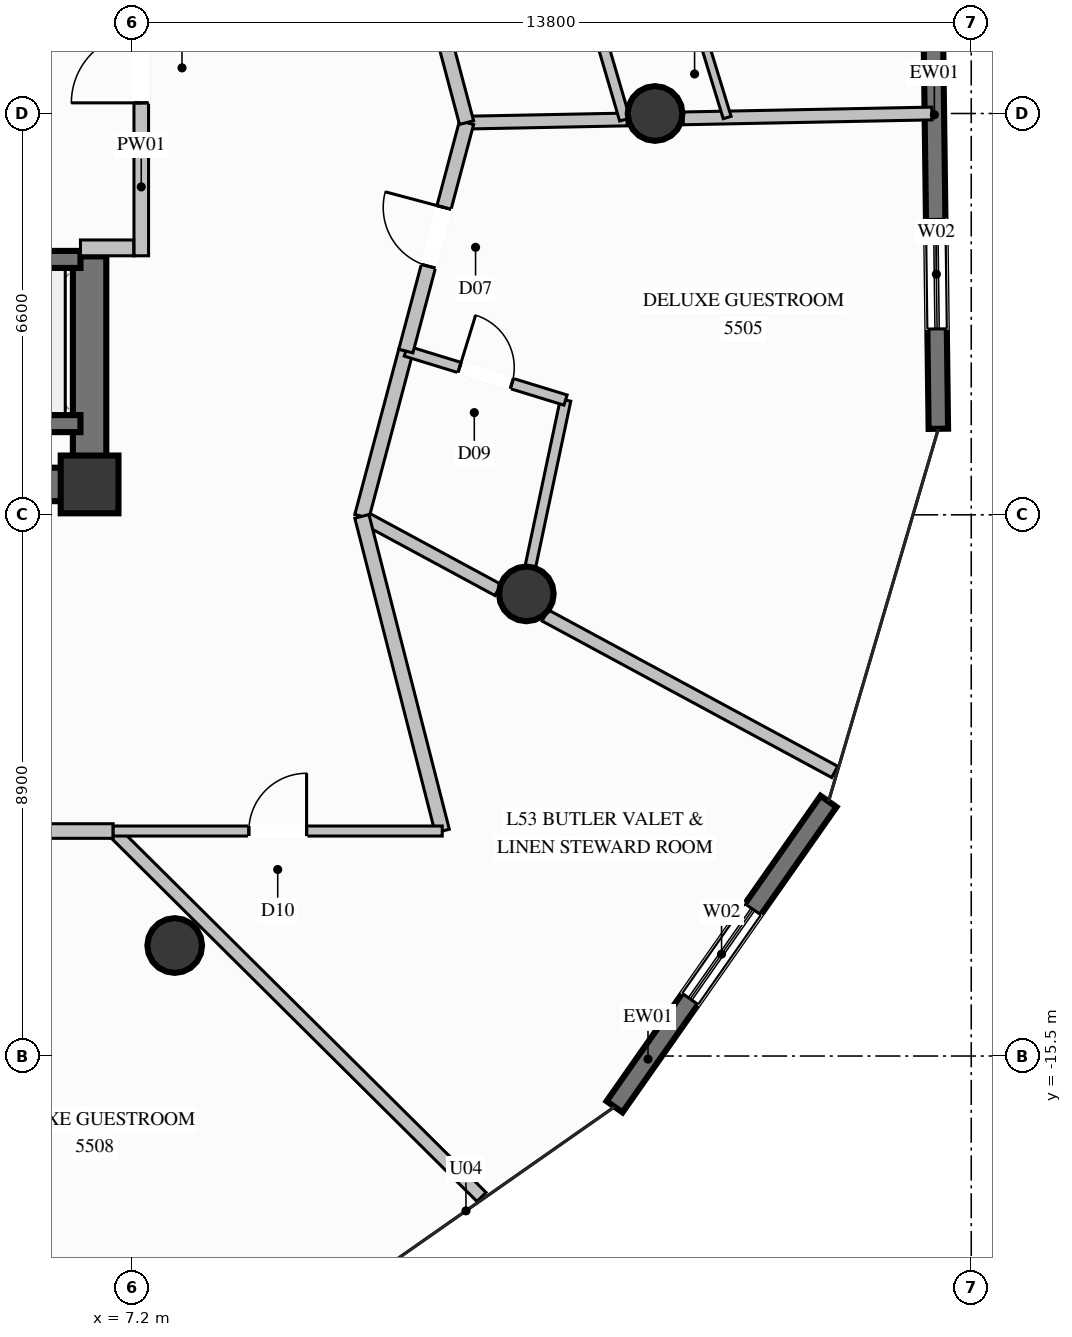
"""IFC4 building model, lengths in metres.
Left out: names, types, materials, properties, quantities, classifications, styles, units other than length and angle.
Written with IfcOpenShell. Run it as: python <this file> out.ifc"""

import sys

from ifc_helpers import new_model, si_unit, direction, frame, frame_2d, origin, origin_2d, place, context, subcontext, project, spatial, rectangle, circle, extrude, element, fill, save


model = new_model("IFC4")
c1 = context("Model", 3, precision=1e-05, world=origin(), true_north=direction((0.0, 1.0)))
c2 = subcontext(c1, "Body", "Model", "MODEL_VIEW")
j1 = project(units=[si_unit("LENGTHUNIT", "METRE"), si_unit("PLANEANGLEUNIT", "RADIAN")], contexts=[c1])
p1 = place(None, origin())
s1 = spatial("IfcSite", under=j1, at=p1, CompositionType="ELEMENT")
p2 = place(p1, origin())
s2 = spatial("IfcBuilding", under=s1, at=p2, CompositionType="ELEMENT")
p3 = place(p2, frame((0.0, 0.0, 205.6)))
s3 = spatial("IfcBuildingStorey", under=s2, at=p3, CompositionType="ELEMENT", Elevation=205.6)
p4 = place(p3, frame((6.5, -6.1, 0.0), z_axis=(0.0, 0.0, 1.0), x_axis=(1.0, 0.0, 0.0)))
e1 = element("IfcColumn", 1, at=p4, inside=s3, PredefinedType="COLUMN", context=c2, shape_type="SweptSolid", body=[
    extrude(rectangle(XDim=0.95, YDim=0.95, at=origin_2d()), origin(), (0.0, 0.0, 1.0), 3.6),
])
p5 = place(p3, frame((4.15, -6.1, 0.0), z_axis=(0.0, 0.0, 1.0), x_axis=(1.0, 0.0, 0.0)))
e2 = element("IfcWall", 2, at=p5, inside=s3, PredefinedType="SHEAR", context=c2, shape_type="SweptSolid", body=[
    extrude(rectangle(XDim=2.075, YDim=0.55, at=frame_2d((1.038, 0.0))), origin(), (0.0, 0.0, 1.0), 3.6),
])
p6 = place(p3, frame((6.5, -6.375, 0.0), z_axis=(0.0, 0.0, 1.0), x_axis=(0.0, 1.0, 0.0)))
e3 = element("IfcWall", 3, at=p6, inside=s3, PredefinedType="SHEAR", context=c2, shape_type="SweptSolid", body=[
    extrude(rectangle(XDim=4.025, YDim=0.55, at=frame_2d((2.012, 0.0))), origin(), (0.0, 0.0, 1.0), 3.6),
])
for number, where, z_axis, x_axis in (
    (4, (15.8, 0.0, 0.0), (0.0, 0.0, 1.0), (1.0, 0.0, 0.0)),
    (5, (7.9, -13.683, 0.0), (0.0, 0.0, 1.0), (1.0, 0.0, 0.0)),
    (6, (13.683, -7.9, 0.0), (0.0, 0.0, 1.0), (1.0, 0.0, 0.0)),
):
    element("IfcColumn", number, at=place(p3, frame(where, z_axis=z_axis, x_axis=x_axis)), inside=s3, PredefinedType="COLUMN", context=c2, shape_type="SweptSolid", body=[
        extrude(circle(Radius=0.45, at=origin_2d()), origin(), (0.0, 0.0, 1.0), 3.6),
    ])
p7 = place(p3, frame((18.653, -11.313, 0.0), z_axis=(0.0, 0.0, 1.0), x_axis=(-0.573863076695, -0.818951261802, 0.0)))
e7 = element("IfcWall", 7, at=p7, inside=s3, PredefinedType="SOLIDWALL", context=c2, shape_type="SweptSolid", body=[
    extrude(rectangle(XDim=6.132, YDim=0.32, at=frame_2d((3.066, 0.0))), origin(), (0.0, 0.0, 1.0), 3.36),
])
p8 = place(p7, frame((2.166, 0.0, 0.35)))
e8 = element("IfcOpeningElement", 8, at=p8, cuts=e7, PredefinedType="OPENING", context=c2, shape_type="SweptSolid", body=[
    extrude(rectangle(XDim=1.8, YDim=2.6, at=frame_2d((0.9, 1.3))), frame((0.0, 0.17, 0.0), z_axis=(0.0, -1.0, 0.0), x_axis=(1.0, 0.0, 0.0)), (0.0, 0.0, 1.0), 0.34),
])
p9 = place(p3, frame((20.375, 1.451, 0.0), z_axis=(0.0, 0.0, 1.0), x_axis=(0.012654885904, -0.999919923725, 0.0)))
e9 = element("IfcWall", 9, at=p9, inside=s3, PredefinedType="SOLIDWALL", context=c2, shape_type="SweptSolid", body=[
    extrude(rectangle(XDim=6.636, YDim=0.32, at=frame_2d((3.318, 0.0))), origin(), (0.0, 0.0, 1.0), 3.36),
])
p10 = place(p9, frame((3.194, 0.0, 0.35)))
e10 = element("IfcOpeningElement", 10, at=p10, cuts=e9, PredefinedType="OPENING", context=c2, shape_type="SweptSolid", body=[
    extrude(rectangle(XDim=1.8, YDim=2.6, at=frame_2d((0.9, 1.3))), frame((0.0, 0.17, 0.0), z_axis=(0.0, -1.0, 0.0), x_axis=(1.0, 0.0, 0.0)), (0.0, 0.0, 1.0), 0.34),
])
p11 = place(p3, frame((4.15, -5.1, 0.0), z_axis=(0.0, 0.0, 1.0), x_axis=(1.0, 0.0, 0.0)))
e11 = element("IfcWall", 11, at=p11, inside=s3, PredefinedType="SOLIDWALL", context=c2, shape_type="SweptSolid", body=[
    extrude(rectangle(XDim=2.2, YDim=0.28, at=frame_2d((1.1, 0.0))), origin(), (0.0, 0.0, 1.0), 3.36),
])
p12 = place(p3, frame((6.35, -2.4, 0.0), z_axis=(0.0, 0.0, 1.0), x_axis=(-1.0, 0.0, 0.0)))
e12 = element("IfcWall", 12, at=p12, inside=s3, PredefinedType="SOLIDWALL", context=c2, shape_type="SweptSolid", body=[
    extrude(rectangle(XDim=2.2, YDim=0.28, at=frame_2d((1.1, 0.0))), origin(), (0.0, 0.0, 1.0), 3.36),
])
p13 = place(p12, frame((0.5, 0.0, 0.0)))
e13 = element("IfcOpeningElement", 13, at=p13, cuts=e12, PredefinedType="OPENING", context=c2, shape_type="SweptSolid", body=[
    extrude(rectangle(XDim=1.2, YDim=2.2, at=frame_2d((0.6, 1.1))), frame((0.0, 0.15, 0.0), z_axis=(0.0, -1.0, 0.0), x_axis=(1.0, 0.0, 0.0)), (0.0, 0.0, 1.0), 0.3),
])
p14 = place(p3, frame((7.35, -2.34, 0.0), z_axis=(0.0, 0.0, 1.0), x_axis=(0.0, 1.0, 0.0)))
e14 = element("IfcWall", 14, at=p14, inside=s3, PredefinedType="PARTITIONING", context=c2, shape_type="SweptSolid", body=[
    extrude(rectangle(XDim=5.02, YDim=0.24, at=frame_2d((2.51, 0.0))), origin(), (0.0, 0.0, 1.0), 2.445),
])
p15 = place(p14, frame((2.515, 0.0, 0.0)))
e15 = element("IfcOpeningElement", 15, at=p15, cuts=e14, PredefinedType="OPENING", context=c2, shape_type="SweptSolid", body=[
    extrude(rectangle(XDim=1.15, YDim=2.2, at=frame_2d((0.575, 1.1))), frame((0.0, 0.13, 0.0), z_axis=(0.0, -1.0, 0.0), x_axis=(1.0, 0.0, 0.0)), (0.0, 0.0, 1.0), 0.26),
])
p16 = place(p3, frame((6.35, -2.21, 0.0), z_axis=(0.0, 0.0, 1.0), x_axis=(1.0, 0.0, 0.0)))
e16 = element("IfcWall", 16, at=p16, inside=s3, PredefinedType="PARTITIONING", context=c2, shape_type="SweptSolid", body=[
    extrude(rectangle(XDim=0.875, YDim=0.26, at=frame_2d((0.438, 0.0))), origin(), (0.0, 0.0, 1.0), 3.36),
])
p17 = place(p3, frame((12.7, -0.15, 0.0), z_axis=(0.0, 0.0, 1.0), x_axis=(0.999806076636, 0.019692869828, 0.0)))
e17 = element("IfcWall", 17, at=p17, inside=s3, PredefinedType="PARTITIONING", context=c2, shape_type="SweptSolid", body=[
    extrude(rectangle(XDim=2.641, YDim=0.21, at=frame_2d((1.32, 0.0))), origin(), (0.0, 0.0, 1.0), 3.36),
])
p18 = place(p3, frame((16.263, -0.08, 0.0), z_axis=(0.0, 0.0, 1.0), x_axis=(0.999808394628, 0.019574831579, 0.0)))
e18 = element("IfcWall", 18, at=p18, inside=s3, PredefinedType="PARTITIONING", context=c2, shape_type="SweptSolid", body=[
    extrude(rectangle(XDim=4.091, YDim=0.21, at=frame_2d((2.045, 0.0))), origin(), (0.0, 0.0, 1.0), 3.36),
])
p19 = place(p3, frame((10.978, -6.625, 0.0), z_axis=(0.0, 0.0, 1.0), x_axis=(0.879758566632, -0.47542072361, 0.0)))
e19 = element("IfcWall", 19, at=p19, inside=s3, PredefinedType="PARTITIONING", context=c2, shape_type="SweptSolid", body=[
    extrude(rectangle(XDim=2.545, YDim=0.21, at=frame_2d((1.272, 0.0))), origin(), (0.0, 0.0, 1.0), 2.877),
])
p20 = place(p3, frame((13.992, -8.254, 0.0), z_axis=(0.0, 0.0, 1.0), x_axis=(0.879751884647, -0.47543308831, 0.0)))
e20 = element("IfcWall", 20, at=p20, inside=s3, PredefinedType="PARTITIONING", context=c2, shape_type="SweptSolid", body=[
    extrude(rectangle(XDim=5.414, YDim=0.21, at=frame_2d((2.707, 0.0))), origin(), (0.0, 0.0, 1.0), 3.36),
])
p21 = place(p3, frame((10.978, -6.625, 0.0), z_axis=(0.0, 0.0, 1.0), x_axis=(0.256944245483, 0.966426228283, 0.0)))
e21 = element("IfcWall", 21, at=p21, inside=s3, PredefinedType="PARTITIONING", context=c2, shape_type="SweptSolid", body=[
    extrude(rectangle(XDim=2.813, YDim=0.24, at=frame_2d((1.407, 0.0))), origin(), (0.0, 0.0, 1.0), 3.36),
])
p22 = place(p3, frame((13.622, -8.054, 0.0), z_axis=(0.0, 0.0, 1.0), x_axis=(0.206691433245, 0.978406179162, 0.0)))
e22 = element("IfcWall", 22, at=p22, inside=s3, PredefinedType="PLUMBINGWALL", context=c2, shape_type="SweptSolid", body=[
    extrude(rectangle(XDim=3.415, YDim=0.175, at=frame_2d((1.708, 0.0))), origin(), (0.0, 0.0, 1.0), 2.929),
])
p23 = place(p3, frame((11.701, -3.906, 0.0), z_axis=(0.0, 0.0, 1.0), x_axis=(0.955922959591, -0.293617600506, 0.0)))
e23 = element("IfcWall", 23, at=p23, inside=s3, PredefinedType="PLUMBINGWALL", context=c2, shape_type="SweptSolid", body=[
    extrude(rectangle(XDim=2.748, YDim=0.175, at=frame_2d((1.374, 0.0))), origin(), (0.0, 0.0, 1.0), 3.36),
])
p24 = place(p23, frame((0.924, 0.0, 0.0)))
e24 = element("IfcOpeningElement", 24, at=p24, cuts=e23, PredefinedType="OPENING", context=c2, shape_type="SweptSolid", body=[
    extrude(rectangle(XDim=0.9, YDim=2.1, at=frame_2d((0.45, 1.05))), frame((0.0, 0.098, 0.0), z_axis=(0.0, -1.0, 0.0), x_axis=(1.0, 0.0, 0.0)), (0.0, 0.0, 1.0), 0.195),
])
p25 = place(p3, frame((11.701, -3.906, 0.0), z_axis=(0.0, 0.0, 1.0), x_axis=(0.257037057674, 0.966401547486, 0.0)))
e25 = element("IfcWall", 25, at=p25, inside=s3, PredefinedType="PARTITIONING", context=c2, shape_type="SweptSolid", body=[
    extrude(rectangle(XDim=3.887, YDim=0.24, at=frame_2d((1.943, 0.0))), origin(), (0.0, 0.0, 1.0), 3.36),
])
p26 = place(p25, frame((1.443, 0.0, 0.0)))
e26 = element("IfcOpeningElement", 26, at=p26, cuts=e25, PredefinedType="OPENING", context=c2, shape_type="SweptSolid", body=[
    extrude(rectangle(XDim=1.0, YDim=2.2, at=frame_2d((0.5, 1.1))), frame((0.0, 0.13, 0.0), z_axis=(0.0, -1.0, 0.0), x_axis=(1.0, 0.0, 0.0)), (0.0, 0.0, 1.0), 0.26),
])
p27 = place(p3, frame((12.7, -0.15, 0.0), z_axis=(0.0, 0.0, 1.0), x_axis=(-0.256858081143, 0.966449132729, 0.0)))
e27 = element("IfcWall", 27, at=p27, inside=s3, PredefinedType="PARTITIONING", context=c2, shape_type="SweptSolid", body=[
    extrude(rectangle(XDim=2.814, YDim=0.24, at=frame_2d((1.407, 0.0))), origin(), (0.0, 0.0, 1.0), 3.36),
])
p28 = place(p3, frame((15.302, -0.099, 0.0), z_axis=(0.0, 0.0, 1.0), x_axis=(-0.280987384428, 0.959711461739, 0.0)))
e28 = element("IfcWall", 28, at=p28, inside=s3, PredefinedType="PLUMBINGWALL", context=c2, shape_type="SweptSolid", body=[
    extrude(rectangle(XDim=3.342, YDim=0.175, at=frame_2d((1.671, 0.0))), origin(), (0.0, 0.0, 1.0), 2.929),
])
p29 = place(p3, frame((16.986, -0.066, 0.0), z_axis=(0.0, 0.0, 1.0), x_axis=(-0.292847255907, 0.956159236062, 0.0)))
e29 = element("IfcWall", 29, at=p29, inside=s3, PredefinedType="PARTITIONING", context=c2, shape_type="SweptSolid", body=[
    extrude(rectangle(XDim=8.77, YDim=0.135, at=frame_2d((4.385, 0.0))), origin(), (0.0, 0.0, 1.0), 3.36),
])
p30 = place(p29, frame((3.91, 0.0, 0.0)))
e30 = element("IfcOpeningElement", 30, at=p30, cuts=e29, PredefinedType="OPENING", context=c2, shape_type="SweptSolid", body=[
    extrude(rectangle(XDim=0.95, YDim=2.1, at=frame_2d((0.475, 1.05))), frame((0.0, 0.078, 0.0), z_axis=(0.0, -1.0, 0.0), x_axis=(1.0, 0.0, 0.0)), (0.0, 0.0, 1.0), 0.155),
])
p31 = place(p3, frame((6.888, -11.8, 0.0), z_axis=(0.0, 0.0, 1.0), x_axis=(0.709447324451, -0.704758464887, 0.0)))
e31 = element("IfcWall", 31, at=p31, inside=s3, PredefinedType="PARTITIONING", context=c2, shape_type="SweptSolid", body=[
    extrude(rectangle(XDim=8.539, YDim=0.21, at=frame_2d((4.27, 0.0))), origin(), (0.0, 0.0, 1.0), 3.36),
])
p32 = place(p3, frame((3.031, -11.8, 0.0), z_axis=(0.0, 0.0, 1.0), x_axis=(1.0, 0.0, 0.0)))
e32 = element("IfcWall", 32, at=p32, inside=s3, PredefinedType="PARTITIONING", context=c2, shape_type="SweptSolid", body=[
    extrude(rectangle(XDim=3.857, YDim=0.24, at=frame_2d((1.928, 0.0))), origin(), (0.0, 0.0, 1.0), 3.36),
])
p33 = place(p32, frame((1.428, 0.0, 0.0)))
e33 = element("IfcOpeningElement", 33, at=p33, cuts=e32, PredefinedType="OPENING", context=c2, shape_type="SweptSolid", body=[
    extrude(rectangle(XDim=1.0, YDim=2.2, at=frame_2d((0.5, 1.1))), frame((0.0, 0.13, 0.0), z_axis=(0.0, -1.0, 0.0), x_axis=(1.0, 0.0, 0.0)), (0.0, 0.0, 1.0), 0.26),
])
p34 = place(p3, frame((12.3, -11.8, 0.0), z_axis=(0.0, 0.0, 1.0), x_axis=(-0.247511976945, 0.968884833852, 0.0)))
e34 = element("IfcWall", 34, at=p34, inside=s3, PredefinedType="PARTITIONING", context=c2, shape_type="SweptSolid", body=[
    extrude(rectangle(XDim=5.341, YDim=0.24, at=frame_2d((2.671, 0.0))), origin(), (0.0, 0.0, 1.0), 3.36),
])
p35 = place(p3, frame((6.888, -11.8, 0.0), z_axis=(0.0, 0.0, 1.0), x_axis=(1.0, 0.0, 0.0)))
e35 = element("IfcWall", 35, at=p35, inside=s3, PredefinedType="PARTITIONING", context=c2, shape_type="SweptSolid", body=[
    extrude(rectangle(XDim=5.412, YDim=0.165, at=frame_2d((2.706, 0.0))), origin(), (0.0, 0.0, 1.0), 3.36),
])
p36 = place(p35, frame((2.231, 0.0, 0.0)))
e36 = element("IfcOpeningElement", 36, at=p36, cuts=e35, PredefinedType="OPENING", context=c2, shape_type="SweptSolid", body=[
    extrude(rectangle(XDim=0.95, YDim=2.1, at=frame_2d((0.475, 1.05))), frame((0.0, 0.093, 0.0), z_axis=(0.0, -1.0, 0.0), x_axis=(1.0, 0.0, 0.0)), (0.0, 0.0, 1.0), 0.185),
])
p37 = place(p8, origin())
e37 = element("IfcWindow", 37, at=p37, inside=s3, PartitioningType="SINGLE_PANEL", PredefinedType="WINDOW", context=c2, shape_type="SweptSolid", body=[
    extrude(rectangle(XDim=1.8, YDim=2.6, at=frame_2d((0.9, 1.3))), frame((0.0, 0.03, 0.0), z_axis=(0.0, -1.0, 0.0), x_axis=(1.0, 0.0, 0.0)), (0.0, 0.0, 1.0), 0.06),
])
fill(e8, e37)
p38 = place(p10, origin())
e38 = element("IfcWindow", 38, at=p38, inside=s3, PartitioningType="SINGLE_PANEL", PredefinedType="WINDOW", context=c2, shape_type="SweptSolid", body=[
    extrude(rectangle(XDim=1.8, YDim=2.6, at=frame_2d((0.9, 1.3))), frame((0.0, 0.03, 0.0), z_axis=(0.0, -1.0, 0.0), x_axis=(1.0, 0.0, 0.0)), (0.0, 0.0, 1.0), 0.06),
])
fill(e10, e38)
p39 = place(p15, origin())
e39 = element("IfcDoor", 39, at=p39, inside=s3, OperationType="SINGLE_SWING_LEFT", PredefinedType="DOOR", context=c2, shape_type="SweptSolid", body=[
    extrude(rectangle(XDim=1.15, YDim=2.2, at=frame_2d((0.575, 1.1))), frame((0.0, 0.025, 0.0), z_axis=(0.0, -1.0, 0.0), x_axis=(1.0, 0.0, 0.0)), (0.0, 0.0, 1.0), 0.05),
])
fill(e15, e39)
p40 = place(p24, origin())
e40 = element("IfcDoor", 40, at=p40, inside=s3, OperationType="SINGLE_SWING_LEFT", PredefinedType="DOOR", context=c2, shape_type="SweptSolid", body=[
    extrude(rectangle(XDim=0.9, YDim=2.1, at=frame_2d((0.45, 1.05))), frame((0.0, 0.025, 0.0), z_axis=(0.0, -1.0, 0.0), x_axis=(1.0, 0.0, 0.0)), (0.0, 0.0, 1.0), 0.05),
])
fill(e24, e40)
p41 = place(p26, origin())
e41 = element("IfcDoor", 41, at=p41, inside=s3, OperationType="SINGLE_SWING_RIGHT", PredefinedType="DOOR", context=c2, shape_type="SweptSolid", body=[
    extrude(rectangle(XDim=1.0, YDim=2.2, at=frame_2d((0.5, 1.1))), frame((0.0, 0.025, 0.0), z_axis=(0.0, -1.0, 0.0), x_axis=(1.0, 0.0, 0.0)), (0.0, 0.0, 1.0), 0.05),
])
fill(e26, e41)
p42 = place(p36, origin())
e42 = element("IfcDoor", 42, at=p42, inside=s3, OperationType="SINGLE_SWING_RIGHT", PredefinedType="DOOR", context=c2, shape_type="SweptSolid", body=[
    extrude(rectangle(XDim=0.95, YDim=2.1, at=frame_2d((0.475, 1.05))), frame((0.0, 0.025, 0.0), z_axis=(0.0, -1.0, 0.0), x_axis=(1.0, 0.0, 0.0)), (0.0, 0.0, 1.0), 0.05),
])
fill(e36, e42)
save(model, sys.argv[1])
